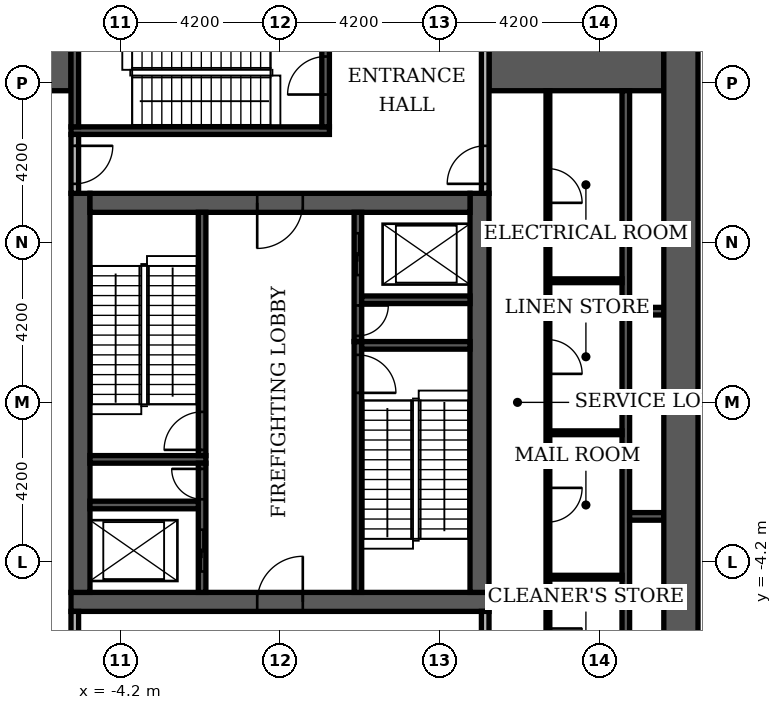
"""IFC4 building model, lengths in metres.
Left out: names, types, materials, properties, quantities, classifications, styles, units other than length and angle.
Written with IfcOpenShell. Run it as: python <this file> out.ifc"""

import sys

from ifc_helpers import new_model, si_unit, direction, frame, frame_2d, origin, place, context, subcontext, project, spatial, rectangle, extrude, element, fill, save


model = new_model("IFC4")
c1 = context("Model", 3, precision=1e-05, world=origin(), true_north=direction((0.0, 1.0)))
c2 = subcontext(c1, "Body", "Model", "MODEL_VIEW")
j1 = project(units=[si_unit("LENGTHUNIT", "METRE"), si_unit("PLANEANGLEUNIT", "RADIAN")], contexts=[c1])
p1 = place(None, origin())
s1 = spatial("IfcSite", under=j1, at=p1, CompositionType="ELEMENT")
p2 = place(p1, origin())
s2 = spatial("IfcBuilding", under=s1, at=p2, CompositionType="ELEMENT")
p3 = place(p2, frame((0.0, 0.0, 16.8)))
s3 = spatial("IfcBuildingStorey", under=s2, at=p3, CompositionType="ELEMENT", Elevation=16.8)
p4 = place(p3, frame((-5.5, -5.25, 0.0), z_axis=(0.0, 0.0, 1.0), x_axis=(1.0, 0.0, 0.0)))
e1 = element("IfcWall", 1, at=p4, inside=s3, PredefinedType="SHEAR", context=c2, shape_type="SweptSolid", body=[
    extrude(rectangle(XDim=11.0, YDim=0.5, at=frame_2d((5.5, 0.0))), origin(), (0.0, 0.0, 1.0), 4.98),
])
p5 = place(p4, frame((4.9, 0.0, 0.0)))
e2 = element("IfcOpeningElement", 2, at=p5, cuts=e1, PredefinedType="OPENING", context=c2, shape_type="SweptSolid", body=[
    extrude(rectangle(XDim=1.2, YDim=2.1, at=frame_2d((0.6, 1.05))), frame((0.0, 0.26, 0.0), z_axis=(0.0, -1.0, 0.0), x_axis=(1.0, 0.0, 0.0)), (0.0, 0.0, 1.0), 0.52),
])
for number, where, z_axis, x_axis in (
    (3, (-5.25, -5.0, 0.0), (0.0, 0.0, 1.0), (0.0, 1.0, 0.0)),
    (4, (5.25, -5.0, 0.0), (0.0, 0.0, 1.0), (0.0, 1.0, 0.0)),
):
    element("IfcWall", number, at=place(p3, frame(where, z_axis=z_axis, x_axis=x_axis)), inside=s3, PredefinedType="SHEAR", context=c2, shape_type="SweptSolid", body=[
        extrude(rectangle(XDim=10.5, YDim=0.5, at=frame_2d((5.25, 0.0))), origin(), (0.0, 0.0, 1.0), 4.98),
    ])
p6 = place(p3, frame((-5.0, 5.25, 0.0), z_axis=(0.0, 0.0, 1.0), x_axis=(1.0, 0.0, 0.0)))
e5 = element("IfcWall", 5, at=p6, inside=s3, PredefinedType="SHEAR", context=c2, shape_type="SweptSolid", body=[
    extrude(rectangle(XDim=10.0, YDim=0.5, at=frame_2d((5.0, 0.0))), origin(), (0.0, 0.0, 1.0), 4.98),
])
p7 = place(p6, frame((4.4, 0.0, 0.0)))
e6 = element("IfcOpeningElement", 6, at=p7, cuts=e5, PredefinedType="OPENING", context=c2, shape_type="SweptSolid", body=[
    extrude(rectangle(XDim=1.2, YDim=2.1, at=frame_2d((0.6, 1.05))), frame((0.0, 0.26, 0.0), z_axis=(0.0, -1.0, 0.0), x_axis=(1.0, 0.0, 0.0)), (0.0, 0.0, 1.0), 0.52),
])
for number, where, z_axis, x_axis in (
    (7, (-10.1, 9.15, 0.0), (0.0, 0.0, 1.0), (1.0, 0.0, 0.0)),
    (8, (5.5, 9.15, 0.0), (0.0, 0.0, 1.0), (1.0, 0.0, 0.0)),
):
    element("IfcWall", number, at=place(p3, frame(where, z_axis=z_axis, x_axis=x_axis)), inside=s3, PredefinedType="SHEAR", context=c2, shape_type="SweptSolid", body=[
        extrude(rectangle(XDim=4.6, YDim=1.9, at=frame_2d((2.3, 0.0))), origin(), (0.0, 0.0, 1.0), 4.98),
    ])
p8 = place(p3, frame((2.05, -5.0, 0.0), z_axis=(0.0, 0.0, 1.0), x_axis=(0.0, 1.0, 0.0)))
e9 = element("IfcWall", 9, at=p8, inside=s3, PredefinedType="SHEAR", context=c2, shape_type="SweptSolid", body=[
    extrude(rectangle(XDim=6.6, YDim=0.2, at=frame_2d((3.3, 0.0))), origin(), (0.0, 0.0, 1.0), 4.98),
])
p9 = place(p8, frame((5.25, 0.0, 0.0)))
e10 = element("IfcOpeningElement", 10, at=p9, cuts=e9, PredefinedType="OPENING", context=c2, shape_type="SweptSolid", body=[
    extrude(rectangle(XDim=1.0, YDim=2.1, at=frame_2d((0.5, 1.05))), frame((0.0, 0.11, 0.0), z_axis=(0.0, -1.0, 0.0), x_axis=(1.0, 0.0, 0.0)), (0.0, 0.0, 1.0), 0.22),
])
p10 = place(p3, frame((-5.0, -1.5, 0.0), z_axis=(0.0, 0.0, 1.0), x_axis=(1.0, 0.0, 0.0)))
e11 = element("IfcWall", 11, at=p10, inside=s3, PredefinedType="SHEAR", context=c2, shape_type="SweptSolid", body=[
    extrude(rectangle(XDim=3.05, YDim=0.2, at=frame_2d((1.525, 0.0))), origin(), (0.0, 0.0, 1.0), 4.98),
])
p11 = place(p3, frame((-2.05, -1.4, 0.0), z_axis=(0.0, 0.0, 1.0), x_axis=(0.0, 1.0, 0.0)))
e12 = element("IfcWall", 12, at=p11, inside=s3, PredefinedType="SHEAR", context=c2, shape_type="SweptSolid", body=[
    extrude(rectangle(XDim=6.4, YDim=0.2, at=frame_2d((3.2, 0.0))), origin(), (0.0, 0.0, 1.0), 4.98),
])
p12 = place(p11, frame((0.15, 0.0, 0.0)))
e13 = element("IfcOpeningElement", 13, at=p12, cuts=e12, PredefinedType="OPENING", context=c2, shape_type="SweptSolid", body=[
    extrude(rectangle(XDim=1.0, YDim=2.1, at=frame_2d((0.5, 1.05))), frame((0.0, 0.11, 0.0), z_axis=(0.0, -1.0, 0.0), x_axis=(1.0, 0.0, 0.0)), (0.0, 0.0, 1.0), 0.22),
])
p13 = place(p3, frame((2.15, 1.5, 0.0), z_axis=(0.0, 0.0, 1.0), x_axis=(1.0, 0.0, 0.0)))
e14 = element("IfcWall", 14, at=p13, inside=s3, PredefinedType="SHEAR", context=c2, shape_type="SweptSolid", body=[
    extrude(rectangle(XDim=2.85, YDim=0.2, at=frame_2d((1.425, 0.0))), origin(), (0.0, 0.0, 1.0), 4.98),
])
p14 = place(p3, frame((-5.5, 7.15, 0.0), z_axis=(0.0, 0.0, 1.0), x_axis=(1.0, 0.0, 0.0)))
e15 = element("IfcWall", 15, at=p14, inside=s3, PredefinedType="SHEAR", context=c2, shape_type="SweptSolid", body=[
    extrude(rectangle(XDim=6.8, YDim=0.2, at=frame_2d((3.4, 0.0))), origin(), (0.0, 0.0, 1.0), 4.98),
])
p15 = place(p3, frame((-5.4, 7.25, 0.0), z_axis=(0.0, 0.0, 1.0), x_axis=(0.0, 1.0, 0.0)))
e16 = element("IfcWall", 16, at=p15, inside=s3, PredefinedType="SHEAR", context=c2, shape_type="SweptSolid", body=[
    extrude(rectangle(XDim=2.85, YDim=0.2, at=frame_2d((1.425, 0.0))), origin(), (0.0, 0.0, 1.0), 4.98),
])
p16 = place(p3, frame((1.2, 7.25, 0.0), z_axis=(0.0, 0.0, 1.0), x_axis=(0.0, 1.0, 0.0)))
e17 = element("IfcWall", 17, at=p16, inside=s3, PredefinedType="SHEAR", context=c2, shape_type="SweptSolid", body=[
    extrude(rectangle(XDim=2.85, YDim=0.2, at=frame_2d((1.425, 0.0))), origin(), (0.0, 0.0, 1.0), 4.98),
])
p17 = place(p16, frame((0.85, 0.0, 0.0)))
e18 = element("IfcOpeningElement", 18, at=p17, cuts=e17, PredefinedType="OPENING", context=c2, shape_type="SweptSolid", body=[
    extrude(rectangle(XDim=1.0, YDim=2.1, at=frame_2d((0.5, 1.05))), frame((0.0, 0.11, 0.0), z_axis=(0.0, -1.0, 0.0), x_axis=(1.0, 0.0, 0.0)), (0.0, 0.0, 1.0), 0.22),
])
p18 = place(p3, frame((9.1, -8.2, 0.0), z_axis=(0.0, 0.0, 1.0), x_axis=(0.0, 1.0, 0.0)))
e19 = element("IfcWall", 19, at=p18, inside=s3, PredefinedType="SHEAR", context=c2, shape_type="SweptSolid", body=[
    extrude(rectangle(XDim=16.4, YDim=0.2, at=frame_2d((8.2, 0.0))), origin(), (0.0, 0.0, 1.0), 4.98),
])
p19 = place(p3, frame((-2.05, -5.0, 0.0), z_axis=(0.0, 0.0, 1.0), x_axis=(0.0, 1.0, 0.0)))
e20 = element("IfcWall", 20, at=p19, inside=s3, PredefinedType="SHEAR", context=c2, shape_type="SweptSolid", body=[
    extrude(rectangle(XDim=3.4, YDim=0.2, at=frame_2d((1.7, 0.0))), origin(), (0.0, 0.0, 1.0), 4.98),
])
p20 = place(p19, frame((0.55, 0.0, 0.0)))
e21 = element("IfcOpeningElement", 21, at=p20, cuts=e20, PredefinedType="OPENING", context=c2, shape_type="SweptSolid", body=[
    extrude(rectangle(XDim=1.1, YDim=2.1, at=frame_2d((0.55, 1.05))), frame((0.0, 0.11, 0.0), z_axis=(0.0, -1.0, 0.0), x_axis=(1.0, 0.0, 0.0)), (0.0, 0.0, 1.0), 0.22),
])
p21 = place(p19, frame((2.45, 0.0, 0.0)))
e22 = element("IfcOpeningElement", 22, at=p21, cuts=e20, PredefinedType="OPENING", context=c2, shape_type="SweptSolid", body=[
    extrude(rectangle(XDim=0.8, YDim=2.1, at=frame_2d((0.4, 1.05))), frame((0.0, 0.11, 0.0), z_axis=(0.0, -1.0, 0.0), x_axis=(1.0, 0.0, 0.0)), (0.0, 0.0, 1.0), 0.22),
])
p22 = place(p3, frame((9.2, -3.0, 0.0), z_axis=(0.0, 0.0, 1.0), x_axis=(1.0, 0.0, 0.0)))
e23 = element("IfcWall", 23, at=p22, inside=s3, PredefinedType="SHEAR", context=c2, shape_type="SweptSolid", body=[
    extrude(rectangle(XDim=0.9, YDim=0.2, at=frame_2d((0.45, 0.0))), origin(), (0.0, 0.0, 1.0), 4.98),
])
p23 = place(p3, frame((-5.0, -2.7, 0.0), z_axis=(0.0, 0.0, 1.0), x_axis=(1.0, 0.0, 0.0)))
e24 = element("IfcWall", 24, at=p23, inside=s3, PredefinedType="SHEAR", context=c2, shape_type="SweptSolid", body=[
    extrude(rectangle(XDim=2.85, YDim=0.2, at=frame_2d((1.425, 0.0))), origin(), (0.0, 0.0, 1.0), 4.98),
])
p24 = place(p3, frame((2.05, 1.6, 0.0), z_axis=(0.0, 0.0, 1.0), x_axis=(0.0, 1.0, 0.0)))
e25 = element("IfcWall", 25, at=p24, inside=s3, PredefinedType="SHEAR", context=c2, shape_type="SweptSolid", body=[
    extrude(rectangle(XDim=3.4, YDim=0.2, at=frame_2d((1.7, 0.0))), origin(), (0.0, 0.0, 1.0), 4.98),
])
p25 = place(p24, frame((1.75, 0.0, 0.0)))
e26 = element("IfcOpeningElement", 26, at=p25, cuts=e25, PredefinedType="OPENING", context=c2, shape_type="SweptSolid", body=[
    extrude(rectangle(XDim=1.1, YDim=2.1, at=frame_2d((0.55, 1.05))), frame((0.0, 0.11, 0.0), z_axis=(0.0, -1.0, 0.0), x_axis=(1.0, 0.0, 0.0)), (0.0, 0.0, 1.0), 0.22),
])
p26 = place(p24, frame((0.15, 0.0, 0.0)))
e27 = element("IfcOpeningElement", 27, at=p26, cuts=e25, PredefinedType="OPENING", context=c2, shape_type="SweptSolid", body=[
    extrude(rectangle(XDim=0.8, YDim=2.1, at=frame_2d((0.4, 1.05))), frame((0.0, 0.11, 0.0), z_axis=(0.0, -1.0, 0.0), x_axis=(1.0, 0.0, 0.0)), (0.0, 0.0, 1.0), 0.22),
])
p27 = place(p3, frame((9.2, 2.4, 0.0), z_axis=(0.0, 0.0, 1.0), x_axis=(1.0, 0.0, 0.0)))
e28 = element("IfcWall", 28, at=p27, inside=s3, PredefinedType="SHEAR", context=c2, shape_type="SweptSolid", body=[
    extrude(rectangle(XDim=0.9, YDim=0.2, at=frame_2d((0.45, 0.0))), origin(), (0.0, 0.0, 1.0), 4.98),
])
p28 = place(p3, frame((2.15, 2.7, 0.0), z_axis=(0.0, 0.0, 1.0), x_axis=(1.0, 0.0, 0.0)))
e29 = element("IfcWall", 29, at=p28, inside=s3, PredefinedType="SHEAR", context=c2, shape_type="SweptSolid", body=[
    extrude(rectangle(XDim=2.85, YDim=0.2, at=frame_2d((1.425, 0.0))), origin(), (0.0, 0.0, 1.0), 4.98),
])
p29 = place(p3, frame((10.55, -10.1, 0.0), z_axis=(0.0, 0.0, 1.0), x_axis=(0.0, 1.0, 0.0)))
e30 = element("IfcWall", 30, at=p29, inside=s3, PredefinedType="SHEAR", context=c2, shape_type="SweptSolid", body=[
    extrude(rectangle(XDim=20.2, YDim=0.9, at=frame_2d((10.1, 0.0))), origin(), (0.0, 0.0, 1.0), 4.98),
])
p30 = place(p3, frame((-5.4, -10.1, 0.0), z_axis=(0.0, 0.0, 1.0), x_axis=(0.0, 1.0, 0.0)))
e31 = element("IfcWall", 31, at=p30, inside=s3, PredefinedType="PARTITIONING", context=c2, shape_type="SweptSolid", body=[
    extrude(rectangle(XDim=4.6, YDim=0.2, at=frame_2d((2.3, 0.0))), origin(), (0.0, 0.0, 1.0), 4.98),
])
p31 = place(p30, frame((2.9, 0.0, 0.0)))
e32 = element("IfcOpeningElement", 32, at=p31, cuts=e31, PredefinedType="OPENING", context=c2, shape_type="SweptSolid", body=[
    extrude(rectangle(XDim=1.0, YDim=2.1, at=frame_2d((0.5, 1.05))), frame((0.0, 0.11, 0.0), z_axis=(0.0, -1.0, 0.0), x_axis=(1.0, 0.0, 0.0)), (0.0, 0.0, 1.0), 0.22),
])
p32 = place(p3, frame((7.05, -8.2, 0.0), z_axis=(0.0, 0.0, 1.0), x_axis=(0.0, 1.0, 0.0)))
e33 = element("IfcWall", 33, at=p32, inside=s3, PredefinedType="PARTITIONING", context=c2, shape_type="SweptSolid", body=[
    extrude(rectangle(XDim=16.4, YDim=0.1, at=frame_2d((8.2, 0.0))), origin(), (0.0, 0.0, 1.0), 4.98),
])
p33 = place(p32, frame((1.35, 0.0, 0.0)))
e34 = element("IfcOpeningElement", 34, at=p33, cuts=e33, PredefinedType="OPENING", context=c2, shape_type="SweptSolid", body=[
    extrude(rectangle(XDim=0.9, YDim=2.1, at=frame_2d((0.45, 1.05))), frame((0.0, 0.06, 0.0), z_axis=(0.0, -1.0, 0.0), x_axis=(1.0, 0.0, 0.0)), (0.0, 0.0, 1.0), 0.12),
])
p34 = place(p32, frame((5.05, 0.0, 0.0)))
e35 = element("IfcOpeningElement", 35, at=p34, cuts=e33, PredefinedType="OPENING", context=c2, shape_type="SweptSolid", body=[
    extrude(rectangle(XDim=0.9, YDim=2.1, at=frame_2d((0.45, 1.05))), frame((0.0, 0.06, 0.0), z_axis=(0.0, -1.0, 0.0), x_axis=(1.0, 0.0, 0.0)), (0.0, 0.0, 1.0), 0.12),
])
p35 = place(p32, frame((8.95, 0.0, 0.0)))
e36 = element("IfcOpeningElement", 36, at=p35, cuts=e33, PredefinedType="OPENING", context=c2, shape_type="SweptSolid", body=[
    extrude(rectangle(XDim=0.9, YDim=2.1, at=frame_2d((0.45, 1.05))), frame((0.0, 0.06, 0.0), z_axis=(0.0, -1.0, 0.0), x_axis=(1.0, 0.0, 0.0)), (0.0, 0.0, 1.0), 0.12),
])
p36 = place(p32, frame((13.45, 0.0, 0.0)))
e37 = element("IfcOpeningElement", 37, at=p36, cuts=e33, PredefinedType="OPENING", context=c2, shape_type="SweptSolid", body=[
    extrude(rectangle(XDim=0.9, YDim=2.1, at=frame_2d((0.45, 1.05))), frame((0.0, 0.06, 0.0), z_axis=(0.0, -1.0, 0.0), x_axis=(1.0, 0.0, 0.0)), (0.0, 0.0, 1.0), 0.12),
])
p37 = place(p3, frame((5.4, -7.9, 0.0), z_axis=(0.0, 0.0, 1.0), x_axis=(0.0, 1.0, 0.0)))
e38 = element("IfcWall", 38, at=p37, inside=s3, PredefinedType="PARTITIONING", context=c2, shape_type="SweptSolid", body=[
    extrude(rectangle(XDim=2.4, YDim=0.2, at=frame_2d((1.2, 0.0))), origin(), (0.0, 0.0, 1.0), 4.98),
])
p38 = place(p37, frame((0.7, 0.0, 0.0)))
e39 = element("IfcOpeningElement", 39, at=p38, cuts=e38, PredefinedType="OPENING", context=c2, shape_type="SweptSolid", body=[
    extrude(rectangle(XDim=1.0, YDim=2.1, at=frame_2d((0.5, 1.05))), frame((0.0, 0.11, 0.0), z_axis=(0.0, -1.0, 0.0), x_axis=(1.0, 0.0, 0.0)), (0.0, 0.0, 1.0), 0.22),
])
for number, where, z_axis, x_axis in (
    (40, (7.1, -4.6, 0.0), (0.0, 0.0, 1.0), (1.0, 0.0, 0.0)),
    (41, (7.1, -0.8, 0.0), (0.0, 0.0, 1.0), (1.0, 0.0, 0.0)),
    (42, (7.1, 3.2, 0.0), (0.0, 0.0, 1.0), (1.0, 0.0, 0.0)),
):
    element("IfcWall", number, at=place(p3, frame(where, z_axis=z_axis, x_axis=x_axis)), inside=s3, PredefinedType="PARTITIONING", context=c2, shape_type="SweptSolid", body=[
        extrude(rectangle(XDim=1.9, YDim=0.1, at=frame_2d((0.95, 0.0))), origin(), (0.0, 0.0, 1.0), 4.98),
    ])
p39 = place(p3, frame((-5.4, 5.5, 0.0), z_axis=(0.0, 0.0, 1.0), x_axis=(0.0, 1.0, 0.0)))
e43 = element("IfcWall", 43, at=p39, inside=s3, PredefinedType="PARTITIONING", context=c2, shape_type="SweptSolid", body=[
    extrude(rectangle(XDim=1.55, YDim=0.2, at=frame_2d((0.775, 0.0))), origin(), (0.0, 0.0, 1.0), 4.98),
])
p40 = place(p39, frame((0.25, 0.0, 0.0)))
e44 = element("IfcOpeningElement", 44, at=p40, cuts=e43, PredefinedType="OPENING", context=c2, shape_type="SweptSolid", body=[
    extrude(rectangle(XDim=1.0, YDim=2.1, at=frame_2d((0.5, 1.05))), frame((0.0, 0.11, 0.0), z_axis=(0.0, -1.0, 0.0), x_axis=(1.0, 0.0, 0.0)), (0.0, 0.0, 1.0), 0.22),
])
p41 = place(p3, frame((5.4, 5.5, 0.0), z_axis=(0.0, 0.0, 1.0), x_axis=(0.0, 1.0, 0.0)))
e45 = element("IfcWall", 45, at=p41, inside=s3, PredefinedType="PARTITIONING", context=c2, shape_type="SweptSolid", body=[
    extrude(rectangle(XDim=4.6, YDim=0.2, at=frame_2d((2.3, 0.0))), origin(), (0.0, 0.0, 1.0), 4.98),
])
p42 = place(p41, frame((0.25, 0.0, 0.0)))
e46 = element("IfcOpeningElement", 46, at=p42, cuts=e45, PredefinedType="OPENING", context=c2, shape_type="SweptSolid", body=[
    extrude(rectangle(XDim=1.0, YDim=2.1, at=frame_2d((0.5, 1.05))), frame((0.0, 0.11, 0.0), z_axis=(0.0, -1.0, 0.0), x_axis=(1.0, 0.0, 0.0)), (0.0, 0.0, 1.0), 0.22),
])
p43 = place(p3, frame((11.0, 0.0, 0.0), z_axis=(0.0, 0.0, 1.0), x_axis=(1.0, 0.0, 0.0)))
e47 = element("IfcWall", 47, at=p43, inside=s3, PredefinedType="PARTITIONING", context=c2, shape_type="SweptSolid", body=[
    extrude(rectangle(XDim=13.6, YDim=0.15, at=frame_2d((6.8, 0.0))), origin(), (0.0, 0.0, 1.0), 4.98),
])
p44 = place(p25, origin())
e48 = element("IfcDoor", 48, at=p44, inside=s3, OperationType="SLIDING_TO_LEFT", PredefinedType="DOOR", context=c2, shape_type="SweptSolid", body=[
    extrude(rectangle(XDim=1.1, YDim=2.1, at=frame_2d((0.55, 1.05))), frame((0.0, 0.025, 0.0), z_axis=(0.0, -1.0, 0.0), x_axis=(1.0, 0.0, 0.0)), (0.0, 0.0, 1.0), 0.05),
])
fill(e26, e48)
p45 = place(p20, origin())
e49 = element("IfcDoor", 49, at=p45, inside=s3, OperationType="SLIDING_TO_LEFT", PredefinedType="DOOR", context=c2, shape_type="SweptSolid", body=[
    extrude(rectangle(XDim=1.1, YDim=2.1, at=frame_2d((0.55, 1.05))), frame((0.0, 0.025, 0.0), z_axis=(0.0, -1.0, 0.0), x_axis=(1.0, 0.0, 0.0)), (0.0, 0.0, 1.0), 0.05),
])
fill(e21, e49)
p46 = place(p12, origin())
e50 = element("IfcDoor", 50, at=p46, inside=s3, OperationType="SINGLE_SWING_LEFT", PredefinedType="DOOR", context=c2, shape_type="SweptSolid", body=[
    extrude(rectangle(XDim=1.0, YDim=2.1, at=frame_2d((0.5, 1.05))), frame((0.0, 0.025, 0.0), z_axis=(0.0, -1.0, 0.0), x_axis=(1.0, 0.0, 0.0)), (0.0, 0.0, 1.0), 0.05),
])
fill(e13, e50)
p47 = place(p9, frame((1.0, 0.0, 0.0), z_axis=(0.0, 0.0, 1.0), x_axis=(-1.0, 0.0, 0.0)))
e51 = element("IfcDoor", 51, at=p47, inside=s3, OperationType="SINGLE_SWING_LEFT", PredefinedType="DOOR", context=c2, shape_type="SweptSolid", body=[
    extrude(rectangle(XDim=1.0, YDim=2.1, at=frame_2d((0.5, 1.05))), frame((0.0, 0.025, 0.0), z_axis=(0.0, -1.0, 0.0), x_axis=(1.0, 0.0, 0.0)), (0.0, 0.0, 1.0), 0.05),
])
fill(e10, e51)
p48 = place(p26, frame((0.8, 0.0, 0.0), z_axis=(0.0, 0.0, 1.0), x_axis=(-1.0, 0.0, 0.0)))
e52 = element("IfcDoor", 52, at=p48, inside=s3, OperationType="SINGLE_SWING_RIGHT", PredefinedType="DOOR", context=c2, shape_type="SweptSolid", body=[
    extrude(rectangle(XDim=0.8, YDim=2.1, at=frame_2d((0.4, 1.05))), frame((0.0, 0.025, 0.0), z_axis=(0.0, -1.0, 0.0), x_axis=(1.0, 0.0, 0.0)), (0.0, 0.0, 1.0), 0.05),
])
fill(e27, e52)
p49 = place(p21, origin())
e53 = element("IfcDoor", 53, at=p49, inside=s3, OperationType="SINGLE_SWING_RIGHT", PredefinedType="DOOR", context=c2, shape_type="SweptSolid", body=[
    extrude(rectangle(XDim=0.8, YDim=2.1, at=frame_2d((0.4, 1.05))), frame((0.0, 0.025, 0.0), z_axis=(0.0, -1.0, 0.0), x_axis=(1.0, 0.0, 0.0)), (0.0, 0.0, 1.0), 0.05),
])
fill(e22, e53)
p50 = place(p7, frame((1.2, 0.0, 0.0), z_axis=(0.0, 0.0, 1.0), x_axis=(-1.0, 0.0, 0.0)))
e54 = element("IfcDoor", 54, at=p50, inside=s3, OperationType="SINGLE_SWING_LEFT", PredefinedType="DOOR", context=c2, shape_type="SweptSolid", body=[
    extrude(rectangle(XDim=1.2, YDim=2.1, at=frame_2d((0.6, 1.05))), frame((0.0, 0.025, 0.0), z_axis=(0.0, -1.0, 0.0), x_axis=(1.0, 0.0, 0.0)), (0.0, 0.0, 1.0), 0.05),
])
fill(e6, e54)
p51 = place(p5, origin())
e55 = element("IfcDoor", 55, at=p51, inside=s3, OperationType="SINGLE_SWING_RIGHT", PredefinedType="DOOR", context=c2, shape_type="SweptSolid", body=[
    extrude(rectangle(XDim=1.2, YDim=2.1, at=frame_2d((0.6, 1.05))), frame((0.0, 0.025, 0.0), z_axis=(0.0, -1.0, 0.0), x_axis=(1.0, 0.0, 0.0)), (0.0, 0.0, 1.0), 0.05),
])
fill(e2, e55)
p52 = place(p17, origin())
e56 = element("IfcDoor", 56, at=p52, inside=s3, OperationType="SINGLE_SWING_LEFT", PredefinedType="DOOR", context=c2, shape_type="SweptSolid", body=[
    extrude(rectangle(XDim=1.0, YDim=2.1, at=frame_2d((0.5, 1.05))), frame((0.0, 0.025, 0.0), z_axis=(0.0, -1.0, 0.0), x_axis=(1.0, 0.0, 0.0)), (0.0, 0.0, 1.0), 0.05),
])
fill(e18, e56)
p53 = place(p40, frame((1.0, 0.0, 0.0), z_axis=(0.0, 0.0, 1.0), x_axis=(-1.0, 0.0, 0.0)))
e57 = element("IfcDoor", 57, at=p53, inside=s3, OperationType="SINGLE_SWING_RIGHT", PredefinedType="DOOR", context=c2, shape_type="SweptSolid", body=[
    extrude(rectangle(XDim=1.0, YDim=2.1, at=frame_2d((0.5, 1.05))), frame((0.0, 0.025, 0.0), z_axis=(0.0, -1.0, 0.0), x_axis=(1.0, 0.0, 0.0)), (0.0, 0.0, 1.0), 0.05),
])
fill(e44, e57)
p54 = place(p42, origin())
e58 = element("IfcDoor", 58, at=p54, inside=s3, OperationType="SINGLE_SWING_LEFT", PredefinedType="DOOR", context=c2, shape_type="SweptSolid", body=[
    extrude(rectangle(XDim=1.0, YDim=2.1, at=frame_2d((0.5, 1.05))), frame((0.0, 0.025, 0.0), z_axis=(0.0, -1.0, 0.0), x_axis=(1.0, 0.0, 0.0)), (0.0, 0.0, 1.0), 0.05),
])
fill(e46, e58)
p55 = place(p33, frame((0.9, 0.0, 0.0), z_axis=(0.0, 0.0, 1.0), x_axis=(-1.0, 0.0, 0.0)))
e59 = element("IfcDoor", 59, at=p55, inside=s3, OperationType="SINGLE_SWING_RIGHT", PredefinedType="DOOR", context=c2, shape_type="SweptSolid", body=[
    extrude(rectangle(XDim=0.9, YDim=2.1, at=frame_2d((0.45, 1.05))), frame((0.0, 0.025, 0.0), z_axis=(0.0, -1.0, 0.0), x_axis=(1.0, 0.0, 0.0)), (0.0, 0.0, 1.0), 0.05),
])
fill(e34, e59)
p56 = place(p34, frame((0.9, 0.0, 0.0), z_axis=(0.0, 0.0, 1.0), x_axis=(-1.0, 0.0, 0.0)))
e60 = element("IfcDoor", 60, at=p56, inside=s3, OperationType="SINGLE_SWING_RIGHT", PredefinedType="DOOR", context=c2, shape_type="SweptSolid", body=[
    extrude(rectangle(XDim=0.9, YDim=2.1, at=frame_2d((0.45, 1.05))), frame((0.0, 0.025, 0.0), z_axis=(0.0, -1.0, 0.0), x_axis=(1.0, 0.0, 0.0)), (0.0, 0.0, 1.0), 0.05),
])
fill(e35, e60)
p57 = place(p35, frame((0.9, 0.0, 0.0), z_axis=(0.0, 0.0, 1.0), x_axis=(-1.0, 0.0, 0.0)))
e61 = element("IfcDoor", 61, at=p57, inside=s3, OperationType="SINGLE_SWING_LEFT", PredefinedType="DOOR", context=c2, shape_type="SweptSolid", body=[
    extrude(rectangle(XDim=0.9, YDim=2.1, at=frame_2d((0.45, 1.05))), frame((0.0, 0.025, 0.0), z_axis=(0.0, -1.0, 0.0), x_axis=(1.0, 0.0, 0.0)), (0.0, 0.0, 1.0), 0.05),
])
fill(e36, e61)
p58 = place(p36, frame((0.9, 0.0, 0.0), z_axis=(0.0, 0.0, 1.0), x_axis=(-1.0, 0.0, 0.0)))
e62 = element("IfcDoor", 62, at=p58, inside=s3, OperationType="SINGLE_SWING_LEFT", PredefinedType="DOOR", context=c2, shape_type="SweptSolid", body=[
    extrude(rectangle(XDim=0.9, YDim=2.1, at=frame_2d((0.45, 1.05))), frame((0.0, 0.025, 0.0), z_axis=(0.0, -1.0, 0.0), x_axis=(1.0, 0.0, 0.0)), (0.0, 0.0, 1.0), 0.05),
])
fill(e37, e62)
save(model, sys.argv[1])
